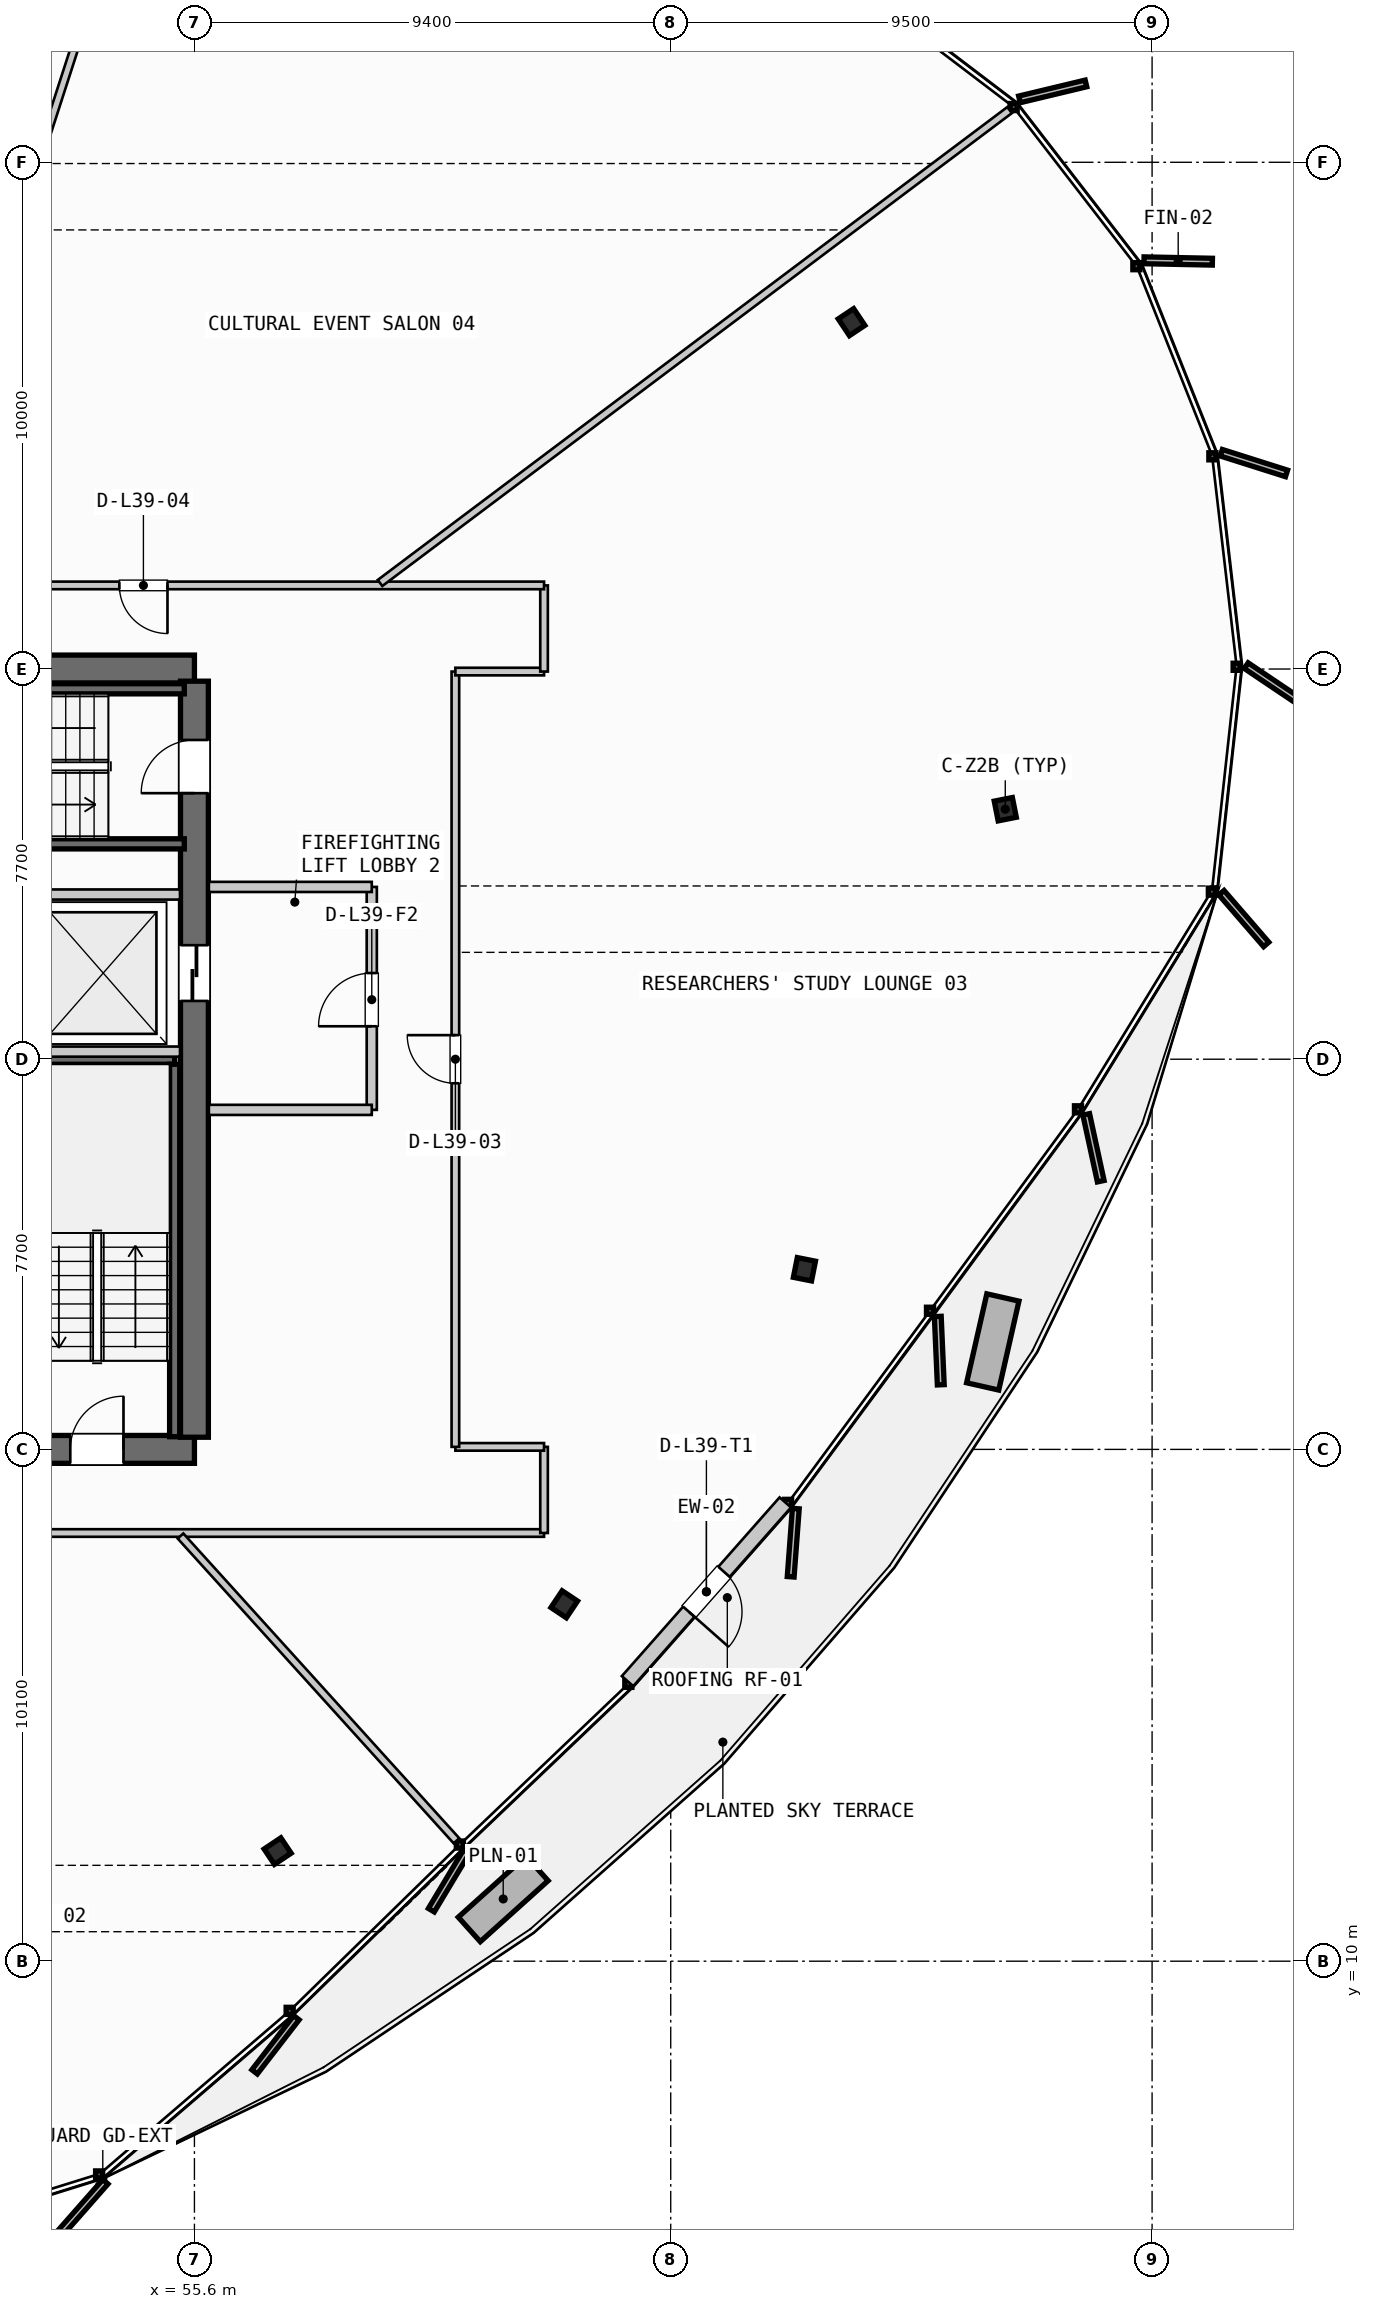
"""IFC4 building model, lengths in metres.
Left out: names, types, materials, properties, quantities, classifications, styles, units other than length and angle.
Written with IfcOpenShell. Run it as: python <this file> out.ifc"""

import sys

from ifc_helpers import new_model, si_unit, direction, frame, frame_2d, origin, origin_2d, place, context, subcontext, project, spatial, rectangle, i_section, extrude, source, transform, mapped, element, fill, save


model = new_model("IFC4")
c1 = context("Model", 3, precision=1e-05, world=origin(), true_north=direction((0.0, 1.0)))
c2 = subcontext(c1, "Body", "Model", "MODEL_VIEW")
j1 = project(units=[si_unit("LENGTHUNIT", "METRE"), si_unit("PLANEANGLEUNIT", "RADIAN")], contexts=[c1])
p1 = place(None, origin())
s1 = spatial("IfcSite", under=j1, at=p1, CompositionType="ELEMENT")
p2 = place(p1, origin())
s2 = spatial("IfcBuilding", under=s1, at=p2, CompositionType="ELEMENT")
p3 = place(p2, frame((0.0, 0.0, 153.65)))
s3 = spatial("IfcBuildingStorey", under=s2, at=p3, CompositionType="ELEMENT", Elevation=153.65)
p4 = place(p3, frame((38.0, 20.1, 0.0), z_axis=(0.0, 0.0, 1.0), x_axis=(1.0, 0.0, 0.0)))
e1 = element("IfcWall", 1, at=p4, inside=s3, PredefinedType="SHEAR", context=c2, shape_type="SweptSolid", body=[
    extrude(rectangle(XDim=17.6, YDim=0.55, at=frame_2d((8.8, 0.0))), origin(), (0.0, 0.0, 1.0), 3.3),
])
p5 = place(p4, frame((1.4, 0.0, 0.0)))
e2 = element("IfcOpeningElement", 2, at=p5, cuts=e1, PredefinedType="OPENING", context=c2, shape_type="SweptSolid", body=[
    extrude(rectangle(XDim=1.05, YDim=2.15, at=frame_2d((0.525, 1.075))), frame((0.0, 0.285, 0.0), z_axis=(0.0, -1.0, 0.0), x_axis=(1.0, 0.0, 0.0)), (0.0, 0.0, 1.0), 0.57),
])
p6 = place(p4, frame((15.15, 0.0, 0.0)))
e3 = element("IfcOpeningElement", 3, at=p6, cuts=e1, PredefinedType="OPENING", context=c2, shape_type="SweptSolid", body=[
    extrude(rectangle(XDim=1.05, YDim=2.15, at=frame_2d((0.525, 1.075))), frame((0.0, 0.285, 0.0), z_axis=(0.0, -1.0, 0.0), x_axis=(1.0, 0.0, 0.0)), (0.0, 0.0, 1.0), 0.57),
])
p7 = place(p4, frame((5.25, 0.0, 0.0)))
e4 = element("IfcOpeningElement", 4, at=p7, cuts=e1, PredefinedType="OPENING", context=c2, shape_type="SweptSolid", body=[
    extrude(rectangle(XDim=0.9, YDim=2.15, at=frame_2d((0.45, 1.075))), frame((0.0, 0.285, 0.0), z_axis=(0.0, -1.0, 0.0), x_axis=(1.0, 0.0, 0.0)), (0.0, 0.0, 1.0), 0.57),
])
p8 = place(p4, frame((11.4, 0.0, 0.0)))
e5 = element("IfcOpeningElement", 5, at=p8, cuts=e1, PredefinedType="OPENING", context=c2, shape_type="SweptSolid", body=[
    extrude(rectangle(XDim=0.95, YDim=2.15, at=frame_2d((0.475, 1.075))), frame((0.0, 0.285, 0.0), z_axis=(0.0, -1.0, 0.0), x_axis=(1.0, 0.0, 0.0)), (0.0, 0.0, 1.0), 0.57),
])
p9 = place(p3, frame((55.6, 35.5, 0.0), z_axis=(0.0, 0.0, 1.0), x_axis=(-1.0, 0.0, 0.0)))
e6 = element("IfcWall", 6, at=p9, inside=s3, PredefinedType="SHEAR", context=c2, shape_type="SweptSolid", body=[
    extrude(rectangle(XDim=17.6, YDim=0.55, at=frame_2d((8.8, 0.0))), origin(), (0.0, 0.0, 1.0), 3.3),
])
p10 = place(p9, frame((8.05, 0.0, 0.0)))
e7 = element("IfcOpeningElement", 7, at=p10, cuts=e6, PredefinedType="OPENING", context=c2, shape_type="SweptSolid", body=[
    extrude(rectangle(XDim=1.5, YDim=2.2, at=frame_2d((0.75, 1.1))), frame((0.0, 0.285, 0.0), z_axis=(0.0, -1.0, 0.0), x_axis=(1.0, 0.0, 0.0)), (0.0, 0.0, 1.0), 0.57),
])
p11 = place(p9, frame((14.95, 0.0, 0.0)))
e8 = element("IfcOpeningElement", 8, at=p11, cuts=e6, PredefinedType="OPENING", context=c2, shape_type="SweptSolid", body=[
    extrude(rectangle(XDim=1.4, YDim=2.3, at=frame_2d((0.7, 1.15))), frame((0.0, 0.285, 0.0), z_axis=(0.0, -1.0, 0.0), x_axis=(1.0, 0.0, 0.0)), (0.0, 0.0, 1.0), 0.57),
])
p12 = place(p9, frame((12.9, 0.0, 0.0)))
e9 = element("IfcOpeningElement", 9, at=p12, cuts=e6, PredefinedType="OPENING", context=c2, shape_type="SweptSolid", body=[
    extrude(rectangle(XDim=0.9, YDim=2.15, at=frame_2d((0.45, 1.075))), frame((0.0, 0.285, 0.0), z_axis=(0.0, -1.0, 0.0), x_axis=(1.0, 0.0, 0.0)), (0.0, 0.0, 1.0), 0.57),
])
p13 = place(p9, frame((10.6, 0.0, 0.0)))
e10 = element("IfcOpeningElement", 10, at=p13, cuts=e6, PredefinedType="OPENING", context=c2, shape_type="SweptSolid", body=[
    extrude(rectangle(XDim=0.95, YDim=2.15, at=frame_2d((0.475, 1.075))), frame((0.0, 0.285, 0.0), z_axis=(0.0, -1.0, 0.0), x_axis=(1.0, 0.0, 0.0)), (0.0, 0.0, 1.0), 0.57),
])
p14 = place(p3, frame((55.6, 20.34, 0.0), z_axis=(0.0, 0.0, 1.0), x_axis=(0.0, 1.0, 0.0)))
e11 = element("IfcWall", 11, at=p14, inside=s3, PredefinedType="SHEAR", context=c2, shape_type="SweptSolid", body=[
    extrude(rectangle(XDim=14.92, YDim=0.55, at=frame_2d((7.46, 0.0))), origin(), (0.0, 0.0, 1.0), 3.3),
])
p15 = place(p14, frame((12.71, 0.0, 0.0)))
e12 = element("IfcOpeningElement", 12, at=p15, cuts=e11, PredefinedType="OPENING", context=c2, shape_type="SweptSolid", body=[
    extrude(rectangle(XDim=1.05, YDim=2.15, at=frame_2d((0.525, 1.075))), frame((0.0, 0.285, 0.0), z_axis=(0.0, -1.0, 0.0), x_axis=(1.0, 0.0, 0.0)), (0.0, 0.0, 1.0), 0.57),
])
p16 = place(p14, frame((8.61, 0.0, 0.0)))
e13 = element("IfcOpeningElement", 13, at=p16, cuts=e11, PredefinedType="OPENING", context=c2, shape_type="SweptSolid", body=[
    extrude(rectangle(XDim=1.1, YDim=2.2, at=frame_2d((0.55, 1.1))), frame((0.0, 0.285, 0.0), z_axis=(0.0, -1.0, 0.0), x_axis=(1.0, 0.0, 0.0)), (0.0, 0.0, 1.0), 0.57),
])
m1 = source(origin(), c2, "Body", "SweptSolid", [
    extrude(i_section(OverallWidth=0.397, OverallDepth=0.365, WebThickness=0.028, FlangeThickness=0.044, FilletRadius=0.015, at=origin_2d()), origin(), (0.0, 0.0, 1.0), 3.3),
])
for number, where, z_axis, x_axis in (
    (14, (71.603, 32.733, 0.0), (0.0, 0.0, 1.0), (0.981, 0.195, 0.0)),
    (15, (68.569, 42.345, 0.0), (0.0, 0.0, 1.0), (0.831, 0.556, 0.0)),
    (16, (57.242, 12.172, 0.0), (0.0, 0.0, 1.0), (0.556, -0.831, 0.0)),
    (17, (62.899, 17.043, 0.0), (0.0, 0.0, 1.0), (0.831, -0.556, 0.0)),
    (18, (67.639, 23.655, 0.0), (0.0, 0.0, 1.0), (0.981, -0.195, 0.0)),
):
    element("IfcColumn", number, at=place(p3, frame(where, z_axis=z_axis, x_axis=x_axis)), inside=s3, PredefinedType="COLUMN", context=c2, shape_type="MappedRepresentation", body=[
        mapped(m1, transform((0.0, 0.0, 0.0), scale=1.0)),
    ])
p17 = place(p3, frame((67.261, 19.054, 0.0), z_axis=(0.0, 0.0, 1.0), x_axis=(-0.661702301401, -0.749766673253, 0.0)))
e19 = element("IfcWall", 19, at=p17, inside=s3, PredefinedType="SOLIDWALL", context=c2, shape_type="SweptSolid", body=[
    extrude(rectangle(XDim=4.705, YDim=0.3, at=frame_2d((2.352, 0.0))), origin(), (0.0, 0.0, 1.0), 2.725),
])
p18 = place(p17, frame((1.827, 0.0, 0.0)))
e20 = element("IfcOpeningElement", 20, at=p18, cuts=e19, PredefinedType="OPENING", context=c2, shape_type="SweptSolid", body=[
    extrude(rectangle(XDim=1.05, YDim=2.2, at=frame_2d((0.525, 1.1))), frame((0.0, 0.16, 0.0), z_axis=(0.0, -1.0, 0.0), x_axis=(1.0, 0.0, 0.0)), (0.0, 0.0, 1.0), 0.32),
])
p19 = place(p3, frame((52.15, 27.8, 0.0), z_axis=(0.0, 0.0, 1.0), x_axis=(1.0, 0.0, 0.0)))
e21 = element("IfcWall", 21, at=p19, inside=s3, PredefinedType="SHEAR", context=c2, shape_type="SweptSolid", body=[
    extrude(rectangle(XDim=3.06, YDim=0.2, at=frame_2d((1.53, 0.0))), origin(), (0.0, 0.0, 1.0), 3.3),
])
for number, where, z_axis, x_axis in (
    (22, (55.21, 27.7, 0.0), (0.0, 0.0, 1.0), (0.0, -1.0, 0.0)),
    (23, (48.05, 35.11, 0.0), (0.0, 0.0, 1.0), (1.0, 0.0, 0.0)),
    (24, (55.4, 32.05, 0.0), (0.0, 0.0, 1.0), (-1.0, 0.0, 0.0)),
):
    element("IfcWall", number, at=place(p3, frame(where, z_axis=z_axis, x_axis=x_axis)), inside=s3, PredefinedType="SHEAR", context=c2, shape_type="SweptSolid", body=[
        extrude(rectangle(XDim=7.35, YDim=0.2, at=frame_2d((3.675, 0.0))), origin(), (0.0, 0.0, 1.0), 3.3),
    ])
for number, where, z_axis, x_axis in (
    (25, (52.45, 27.95, 0.0), (0.0, 0.0, 1.0), (1.0, 0.0, 0.0)),
    (26, (52.45, 31.05, 0.0), (0.0, 0.0, 1.0), (1.0, 0.0, 0.0)),
):
    element("IfcWall", number, at=place(p3, frame(where, z_axis=z_axis, x_axis=x_axis)), inside=s3, PredefinedType="PARTITIONING", context=c2, shape_type="SweptSolid", body=[
        extrude(rectangle(XDim=2.865, YDim=0.2, at=frame_2d((1.433, 0.0))), origin(), (0.0, 0.0, 1.0), 2.28),
    ])
p20 = place(p3, frame((59.1, 26.8, 0.0), z_axis=(0.0, 0.0, 1.0), x_axis=(0.0, 1.0, 0.0)))
e27 = element("IfcWall", 27, at=p20, inside=s3, PredefinedType="PARTITIONING", context=c2, shape_type="SweptSolid", body=[
    extrude(rectangle(XDim=4.4, YDim=0.2, at=frame_2d((2.2, 0.0))), origin(), (0.0, 0.0, 1.0), 2.28),
])
p21 = place(p20, frame((1.65, 0.0, 0.0)))
e28 = element("IfcOpeningElement", 28, at=p21, cuts=e27, PredefinedType="OPENING", context=c2, shape_type="SweptSolid", body=[
    extrude(rectangle(XDim=1.05, YDim=2.15, at=frame_2d((0.525, 1.075))), frame((0.0, 0.11, 0.0), z_axis=(0.0, -1.0, 0.0), x_axis=(1.0, 0.0, 0.0)), (0.0, 0.0, 1.0), 0.22),
])
for number, where, z_axis, x_axis in (
    (29, (55.885, 26.8, 0.0), (0.0, 0.0, 1.0), (1.0, 0.0, 0.0)),
    (30, (55.885, 31.2, 0.0), (0.0, 0.0, 1.0), (1.0, 0.0, 0.0)),
):
    element("IfcWall", number, at=place(p3, frame(where, z_axis=z_axis, x_axis=x_axis)), inside=s3, PredefinedType="PARTITIONING", context=c2, shape_type="SweptSolid", body=[
        extrude(rectangle(XDim=3.215, YDim=0.2, at=frame_2d((1.607, 0.0))), origin(), (0.0, 0.0, 1.0), 2.28),
    ])
p22 = place(p3, frame((31.1, 18.45, 0.0), z_axis=(0.0, 0.0, 1.0), x_axis=(1.0, 0.0, 0.0)))
e31 = element("IfcWall", 31, at=p22, inside=s3, PredefinedType="PARTITIONING", context=c2, shape_type="SweptSolid", body=[
    extrude(rectangle(XDim=31.4, YDim=0.15, at=frame_2d((15.7, 0.0))), origin(), (0.0, 0.0, 1.0), 2.28),
])
p23 = place(p22, frame((7.8, 0.0, 0.0)))
e32 = element("IfcOpeningElement", 32, at=p23, cuts=e31, PredefinedType="OPENING", context=c2, shape_type="SweptSolid", body=[
    extrude(rectangle(XDim=0.95, YDim=2.15, at=frame_2d((0.475, 1.075))), frame((0.0, 0.085, 0.0), z_axis=(0.0, -1.0, 0.0), x_axis=(1.0, 0.0, 0.0)), (0.0, 0.0, 1.0), 0.17),
])
p24 = place(p22, frame((18.167, 0.0, 0.0)))
e33 = element("IfcOpeningElement", 33, at=p24, cuts=e31, PredefinedType="OPENING", context=c2, shape_type="SweptSolid", body=[
    extrude(rectangle(XDim=0.95, YDim=2.15, at=frame_2d((0.475, 1.075))), frame((0.0, 0.085, 0.0), z_axis=(0.0, -1.0, 0.0), x_axis=(1.0, 0.0, 0.0)), (0.0, 0.0, 1.0), 0.17),
])
p25 = place(p3, frame((62.5, 18.45, 0.0), z_axis=(0.0, 0.0, 1.0), x_axis=(0.0, 1.0, 0.0)))
e34 = element("IfcWall", 34, at=p25, inside=s3, PredefinedType="PARTITIONING", context=c2, shape_type="SweptSolid", body=[
    extrude(rectangle(XDim=1.7, YDim=0.15, at=frame_2d((0.85, 0.0))), origin(), (0.0, 0.0, 1.0), 2.28),
])
p26 = place(p3, frame((62.5, 20.15, 0.0), z_axis=(0.0, 0.0, 1.0), x_axis=(-1.0, 0.0, 0.0)))
e35 = element("IfcWall", 35, at=p26, inside=s3, PredefinedType="PARTITIONING", context=c2, shape_type="SweptSolid", body=[
    extrude(rectangle(XDim=1.75, YDim=0.15, at=frame_2d((0.875, 0.0))), origin(), (0.0, 0.0, 1.0), 2.28),
])
p27 = place(p3, frame((60.75, 20.15, 0.0), z_axis=(0.0, 0.0, 1.0), x_axis=(0.0, 1.0, 0.0)))
e36 = element("IfcWall", 36, at=p27, inside=s3, PredefinedType="PARTITIONING", context=c2, shape_type="SweptSolid", body=[
    extrude(rectangle(XDim=15.3, YDim=0.15, at=frame_2d((7.65, 0.0))), origin(), (0.0, 0.0, 1.0), 2.28),
])
p28 = place(p27, frame((7.175, 0.0, 0.0)))
e37 = element("IfcOpeningElement", 37, at=p28, cuts=e36, PredefinedType="OPENING", context=c2, shape_type="SweptSolid", body=[
    extrude(rectangle(XDim=0.95, YDim=2.15, at=frame_2d((0.475, 1.075))), frame((0.0, 0.085, 0.0), z_axis=(0.0, -1.0, 0.0), x_axis=(1.0, 0.0, 0.0)), (0.0, 0.0, 1.0), 0.17),
])
p29 = place(p3, frame((60.75, 35.45, 0.0), z_axis=(0.0, 0.0, 1.0), x_axis=(1.0, 0.0, 0.0)))
e38 = element("IfcWall", 38, at=p29, inside=s3, PredefinedType="PARTITIONING", context=c2, shape_type="SweptSolid", body=[
    extrude(rectangle(XDim=1.75, YDim=0.15, at=frame_2d((0.875, 0.0))), origin(), (0.0, 0.0, 1.0), 2.28),
])
p30 = place(p3, frame((62.5, 35.45, 0.0), z_axis=(0.0, 0.0, 1.0), x_axis=(0.0, 1.0, 0.0)))
e39 = element("IfcWall", 39, at=p30, inside=s3, PredefinedType="PARTITIONING", context=c2, shape_type="SweptSolid", body=[
    extrude(rectangle(XDim=1.7, YDim=0.15, at=frame_2d((0.85, 0.0))), origin(), (0.0, 0.0, 1.0), 2.28),
])
p31 = place(p3, frame((62.5, 37.15, 0.0), z_axis=(0.0, 0.0, 1.0), x_axis=(-1.0, 0.0, 0.0)))
e40 = element("IfcWall", 40, at=p31, inside=s3, PredefinedType="PARTITIONING", context=c2, shape_type="SweptSolid", body=[
    extrude(rectangle(XDim=31.4, YDim=0.15, at=frame_2d((15.7, 0.0))), origin(), (0.0, 0.0, 1.0), 2.28),
])
p32 = place(p31, frame((7.432, 0.0, 0.0)))
e41 = element("IfcOpeningElement", 41, at=p32, cuts=e40, PredefinedType="OPENING", context=c2, shape_type="SweptSolid", body=[
    extrude(rectangle(XDim=0.95, YDim=2.15, at=frame_2d((0.475, 1.075))), frame((0.0, 0.085, 0.0), z_axis=(0.0, -1.0, 0.0), x_axis=(1.0, 0.0, 0.0)), (0.0, 0.0, 1.0), 0.17),
])
p33 = place(p31, frame((20.164, 0.0, 0.0)))
e42 = element("IfcOpeningElement", 42, at=p33, cuts=e40, PredefinedType="OPENING", context=c2, shape_type="SweptSolid", body=[
    extrude(rectangle(XDim=0.95, YDim=2.15, at=frame_2d((0.475, 1.075))), frame((0.0, 0.085, 0.0), z_axis=(0.0, -1.0, 0.0), x_axis=(1.0, 0.0, 0.0)), (0.0, 0.0, 1.0), 0.17),
])
p34 = place(p3, frame((55.326, 18.391, 0.0), z_axis=(0.0, 0.0, 1.0), x_axis=(0.671197708212, -0.741278379889, 0.0)))
e43 = element("IfcWall", 43, at=p34, inside=s3, PredefinedType="PARTITIONING", context=c2, shape_type="SweptSolid", body=[
    extrude(rectangle(XDim=8.114, YDim=0.15, at=frame_2d((4.057, 0.0))), origin(), (0.0, 0.0, 1.0), 2.28),
])
p35 = place(p3, frame((59.263, 37.198, 0.0), z_axis=(0.0, 0.0, 1.0), x_axis=(0.799573694143, 0.600567987521, 0.0)))
e44 = element("IfcWall", 44, at=p35, inside=s3, PredefinedType="PARTITIONING", context=c2, shape_type="SweptSolid", body=[
    extrude(rectangle(XDim=15.539, YDim=0.15, at=frame_2d((7.769, 0.0))), origin(), (0.0, 0.0, 1.0), 2.28),
])
p36 = place(p3, frame((49.826, 37.226, 0.0), z_axis=(0.0, 0.0, 1.0), x_axis=(0.307956150851, 0.951400551373, 0.0)))
e45 = element("IfcWall", 45, at=p36, inside=s3, PredefinedType="PARTITIONING", context=c2, shape_type="SweptSolid", body=[
    extrude(rectangle(XDim=15.979, YDim=0.15, at=frame_2d((7.99, 0.0))), origin(), (0.0, 0.0, 1.0), 2.28),
])
m2 = source(origin(), c2, "Body", "SweptSolid", [
    extrude(rectangle(XDim=1.05, YDim=2.2, at=frame_2d((0.525, 1.1))), frame((0.0, 0.025, 0.0), z_axis=(0.0, -1.0, 0.0), x_axis=(1.0, 0.0, 0.0)), (0.0, 0.0, 1.0), 0.05),
])
p37 = place(p18, origin())
e46 = element("IfcDoor", 46, at=p37, inside=s3, OperationType="SINGLE_SWING_RIGHT", PredefinedType="DOOR", context=c2, shape_type="MappedRepresentation", body=[
    mapped(m2, transform((0.0, 0.0, 0.0), scale=1.0)),
])
fill(e20, e46)
m3 = source(origin(), c2, "Body", "SweptSolid", [
    extrude(rectangle(XDim=1.05, YDim=2.15, at=frame_2d((0.525, 1.075))), frame((0.0, 0.025, 0.0), z_axis=(0.0, -1.0, 0.0), x_axis=(1.0, 0.0, 0.0)), (0.0, 0.0, 1.0), 0.05),
])
p38 = place(p6, origin())
e47 = element("IfcDoor", 47, at=p38, inside=s3, OperationType="SINGLE_SWING_RIGHT", PredefinedType="DOOR", context=c2, shape_type="MappedRepresentation", body=[
    mapped(m3, transform((0.0, 0.0, 0.0), scale=1.0)),
])
fill(e3, e47)
p39 = place(p15, origin())
e48 = element("IfcDoor", 48, at=p39, inside=s3, OperationType="SINGLE_SWING_LEFT", PredefinedType="DOOR", context=c2, shape_type="MappedRepresentation", body=[
    mapped(m3, transform((0.0, 0.0, 0.0), scale=1.0)),
])
fill(e12, e48)
m4 = source(origin(), c2, "Body", "SweptSolid", [
    extrude(rectangle(XDim=1.1, YDim=2.2, at=frame_2d((0.55, 1.1))), frame((0.0, 0.025, 0.0), z_axis=(0.0, -1.0, 0.0), x_axis=(1.0, 0.0, 0.0)), (0.0, 0.0, 1.0), 0.05),
])
p40 = place(p16, origin())
e49 = element("IfcDoor", 49, at=p40, inside=s3, OperationType="SLIDING_TO_RIGHT", PredefinedType="DOOR", context=c2, shape_type="MappedRepresentation", body=[
    mapped(m4, transform((0.0, 0.0, 0.0), scale=1.0)),
])
fill(e13, e49)
p41 = place(p21, origin())
e50 = element("IfcDoor", 50, at=p41, inside=s3, OperationType="SINGLE_SWING_LEFT", PredefinedType="DOOR", context=c2, shape_type="MappedRepresentation", body=[
    mapped(m3, transform((0.0, 0.0, 0.0), scale=1.0)),
])
fill(e28, e50)
m5 = source(origin(), c2, "Body", "SweptSolid", [
    extrude(rectangle(XDim=0.95, YDim=2.15, at=frame_2d((0.475, 1.075))), frame((0.0, 0.025, 0.0), z_axis=(0.0, -1.0, 0.0), x_axis=(1.0, 0.0, 0.0)), (0.0, 0.0, 1.0), 0.05),
])
p42 = place(p28, origin())
e51 = element("IfcDoor", 51, at=p42, inside=s3, OperationType="SINGLE_SWING_RIGHT", PredefinedType="DOOR", context=c2, shape_type="MappedRepresentation", body=[
    mapped(m5, transform((0.0, 0.0, 0.0), scale=1.0)),
])
fill(e37, e51)
p43 = place(p32, origin())
e52 = element("IfcDoor", 52, at=p43, inside=s3, OperationType="SINGLE_SWING_LEFT", PredefinedType="DOOR", context=c2, shape_type="MappedRepresentation", body=[
    mapped(m5, transform((0.0, 0.0, 0.0), scale=1.0)),
])
fill(e41, e52)
save(model, sys.argv[1])
